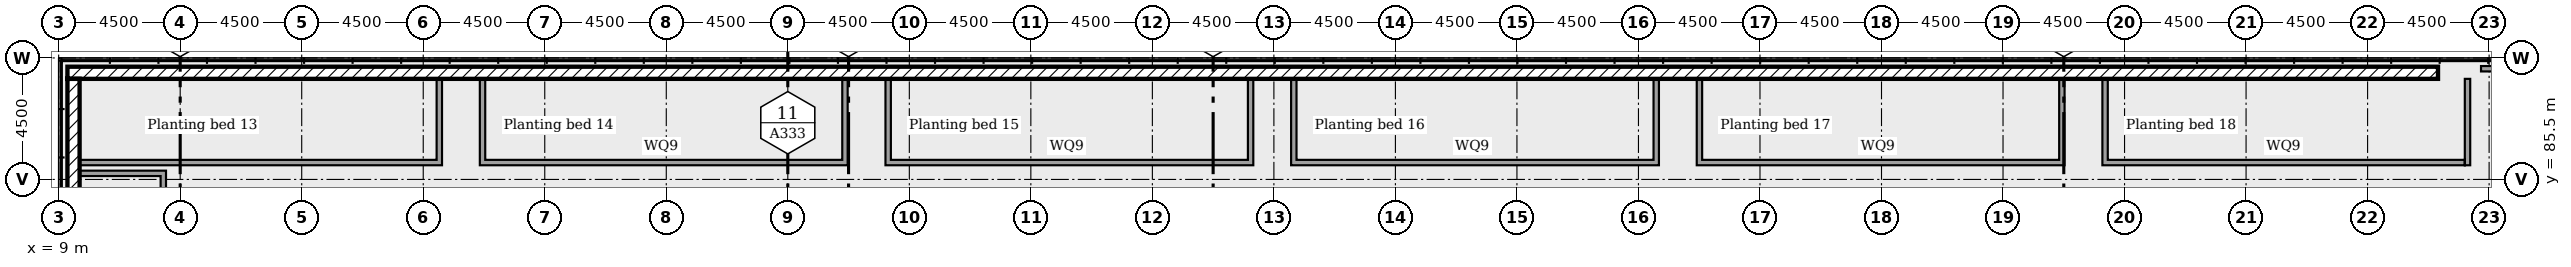
"""IFC4 building model, lengths in metres.
Left out: names, types, materials, properties, quantities, classifications, styles, units other than length and angle.
Written with IfcOpenShell. Run it as: python <this file> out.ifc"""

import sys

from ifc_helpers import new_model, si_unit, direction, frame, frame_2d, origin, place, context, subcontext, project, spatial, rectangle, extrude, element, save


model = new_model("IFC4")
c1 = context("Model", 3, precision=1e-05, world=origin(), true_north=direction((0.0, 1.0)))
c2 = subcontext(c1, "Body", "Model", "MODEL_VIEW")
j1 = project(units=[si_unit("LENGTHUNIT", "METRE"), si_unit("PLANEANGLEUNIT", "RADIAN")], contexts=[c1])
p1 = place(None, origin())
s1 = spatial("IfcSite", under=j1, at=p1, CompositionType="ELEMENT")
p2 = place(p1, origin())
s2 = spatial("IfcBuilding", under=s1, at=p2, CompositionType="ELEMENT")
p3 = place(p2, frame((0.0, 0.0, 11.5)))
s3 = spatial("IfcBuildingStorey", under=s2, at=p3, CompositionType="ELEMENT", Elevation=11.5)
p4 = place(p3, frame((97.107, 89.45, 0.0), z_axis=(0.0, 0.0, 1.0), x_axis=(-1.0, 0.0, 0.0)))
e1 = element("IfcWall", 1, at=p4, inside=s3, PredefinedType="SOLIDWALL", context=c2, shape_type="SweptSolid", body=[
    extrude(rectangle(XDim=87.782, YDim=0.45, at=frame_2d((43.891, 0.0))), origin(), (0.0, 0.0, 1.0), 0.6),
])
p5 = place(p3, frame((9.55, 89.225, 0.0), z_axis=(0.0, 0.0, 1.0), x_axis=(0.0, -1.0, 0.0)))
e2 = element("IfcWall", 2, at=p5, inside=s3, PredefinedType="SOLIDWALL", context=c2, shape_type="SweptSolid", body=[
    extrude(rectangle(XDim=79.45, YDim=0.45, at=frame_2d((39.725, 0.0))), origin(), (0.0, 0.0, 1.0), 0.6),
])
p6 = place(p3, frame((23.096, 86.025, 0.0), z_axis=(0.0, 0.0, 1.0), x_axis=(0.0, 1.0, 0.0)))
e3 = element("IfcWall", 3, at=p6, inside=s3, PredefinedType="SOLIDWALL", context=c2, shape_type="SweptSolid", body=[
    extrude(rectangle(XDim=3.2, YDim=0.2, at=frame_2d((1.6, 0.0))), origin(), (0.0, 0.0, 1.0), 0.45),
])
p7 = place(p3, frame((9.775, 86.125, 0.0)))
e4 = element("IfcWall", 4, at=p7, inside=s3, PredefinedType="SOLIDWALL", context=c2, shape_type="SweptSolid", body=[
    extrude(rectangle(XDim=13.221, YDim=0.2, at=frame_2d((6.61, 0.0))), origin(), (0.0, 0.0, 1.0), 0.45),
])
p8 = place(p3, frame((38.117, 86.025, 0.0), z_axis=(0.0, 0.0, 1.0), x_axis=(0.0, 1.0, 0.0)))
e5 = element("IfcWall", 5, at=p8, inside=s3, PredefinedType="SOLIDWALL", context=c2, shape_type="SweptSolid", body=[
    extrude(rectangle(XDim=3.2, YDim=0.2, at=frame_2d((1.6, 0.0))), origin(), (0.0, 0.0, 1.0), 0.45),
])
p9 = place(p3, frame((24.596, 86.125, 0.0)))
e6 = element("IfcWall", 6, at=p9, inside=s3, PredefinedType="SOLIDWALL", context=c2, shape_type="SweptSolid", body=[
    extrude(rectangle(XDim=13.421, YDim=0.2, at=frame_2d((6.71, 0.0))), origin(), (0.0, 0.0, 1.0), 0.45),
])
p10 = place(p3, frame((24.696, 86.225, 0.0), z_axis=(0.0, 0.0, 1.0), x_axis=(0.0, 1.0, 0.0)))
e7 = element("IfcWall", 7, at=p10, inside=s3, PredefinedType="SOLIDWALL", context=c2, shape_type="SweptSolid", body=[
    extrude(rectangle(XDim=3.0, YDim=0.2, at=frame_2d((1.5, 0.0))), origin(), (0.0, 0.0, 1.0), 0.45),
])
p11 = place(p3, frame((53.137, 86.025, 0.0), z_axis=(0.0, 0.0, 1.0), x_axis=(0.0, 1.0, 0.0)))
e8 = element("IfcWall", 8, at=p11, inside=s3, PredefinedType="SOLIDWALL", context=c2, shape_type="SweptSolid", body=[
    extrude(rectangle(XDim=3.2, YDim=0.2, at=frame_2d((1.6, 0.0))), origin(), (0.0, 0.0, 1.0), 0.45),
])
p12 = place(p3, frame((39.617, 86.125, 0.0)))
e9 = element("IfcWall", 9, at=p12, inside=s3, PredefinedType="SOLIDWALL", context=c2, shape_type="SweptSolid", body=[
    extrude(rectangle(XDim=13.421, YDim=0.2, at=frame_2d((6.71, 0.0))), origin(), (0.0, 0.0, 1.0), 0.45),
])
p13 = place(p3, frame((39.717, 86.225, 0.0), z_axis=(0.0, 0.0, 1.0), x_axis=(0.0, 1.0, 0.0)))
e10 = element("IfcWall", 10, at=p13, inside=s3, PredefinedType="SOLIDWALL", context=c2, shape_type="SweptSolid", body=[
    extrude(rectangle(XDim=3.0, YDim=0.2, at=frame_2d((1.5, 0.0))), origin(), (0.0, 0.0, 1.0), 0.45),
])
p14 = place(p3, frame((68.158, 86.025, 0.0), z_axis=(0.0, 0.0, 1.0), x_axis=(0.0, 1.0, 0.0)))
e11 = element("IfcWall", 11, at=p14, inside=s3, PredefinedType="SOLIDWALL", context=c2, shape_type="SweptSolid", body=[
    extrude(rectangle(XDim=3.2, YDim=0.2, at=frame_2d((1.6, 0.0))), origin(), (0.0, 0.0, 1.0), 0.45),
])
p15 = place(p3, frame((54.637, 86.125, 0.0)))
e12 = element("IfcWall", 12, at=p15, inside=s3, PredefinedType="SOLIDWALL", context=c2, shape_type="SweptSolid", body=[
    extrude(rectangle(XDim=13.421, YDim=0.2, at=frame_2d((6.71, 0.0))), origin(), (0.0, 0.0, 1.0), 0.45),
])
p16 = place(p3, frame((54.738, 86.225, 0.0), z_axis=(0.0, 0.0, 1.0), x_axis=(0.0, 1.0, 0.0)))
e13 = element("IfcWall", 13, at=p16, inside=s3, PredefinedType="SOLIDWALL", context=c2, shape_type="SweptSolid", body=[
    extrude(rectangle(XDim=3.0, YDim=0.2, at=frame_2d((1.5, 0.0))), origin(), (0.0, 0.0, 1.0), 0.45),
])
p17 = place(p3, frame((83.179, 86.025, 0.0), z_axis=(0.0, 0.0, 1.0), x_axis=(0.0, 1.0, 0.0)))
e14 = element("IfcWall", 14, at=p17, inside=s3, PredefinedType="SOLIDWALL", context=c2, shape_type="SweptSolid", body=[
    extrude(rectangle(XDim=3.2, YDim=0.2, at=frame_2d((1.6, 0.0))), origin(), (0.0, 0.0, 1.0), 0.45),
])
p18 = place(p3, frame((69.658, 86.125, 0.0)))
e15 = element("IfcWall", 15, at=p18, inside=s3, PredefinedType="SOLIDWALL", context=c2, shape_type="SweptSolid", body=[
    extrude(rectangle(XDim=13.421, YDim=0.2, at=frame_2d((6.71, 0.0))), origin(), (0.0, 0.0, 1.0), 0.45),
])
p19 = place(p3, frame((69.758, 86.225, 0.0), z_axis=(0.0, 0.0, 1.0), x_axis=(0.0, 1.0, 0.0)))
e16 = element("IfcWall", 16, at=p19, inside=s3, PredefinedType="SOLIDWALL", context=c2, shape_type="SweptSolid", body=[
    extrude(rectangle(XDim=3.0, YDim=0.2, at=frame_2d((1.5, 0.0))), origin(), (0.0, 0.0, 1.0), 0.45),
])
p20 = place(p3, frame((98.2, 86.025, 0.0), z_axis=(0.0, 0.0, 1.0), x_axis=(0.0, 1.0, 0.0)))
e17 = element("IfcWall", 17, at=p20, inside=s3, PredefinedType="SOLIDWALL", context=c2, shape_type="SweptSolid", body=[
    extrude(rectangle(XDim=3.2, YDim=0.2, at=frame_2d((1.6, 0.0))), origin(), (0.0, 0.0, 1.0), 0.45),
])
p21 = place(p3, frame((84.679, 86.125, 0.0)))
e18 = element("IfcWall", 18, at=p21, inside=s3, PredefinedType="SOLIDWALL", context=c2, shape_type="SweptSolid", body=[
    extrude(rectangle(XDim=13.421, YDim=0.2, at=frame_2d((6.71, 0.0))), origin(), (0.0, 0.0, 1.0), 0.45),
])
p22 = place(p3, frame((84.779, 86.225, 0.0), z_axis=(0.0, 0.0, 1.0), x_axis=(0.0, 1.0, 0.0)))
e19 = element("IfcWall", 19, at=p22, inside=s3, PredefinedType="SOLIDWALL", context=c2, shape_type="SweptSolid", body=[
    extrude(rectangle(XDim=3.0, YDim=0.2, at=frame_2d((1.5, 0.0))), origin(), (0.0, 0.0, 1.0), 0.45),
])
p23 = place(p3, frame((12.875, 72.415, 0.0), z_axis=(0.0, 0.0, 1.0), x_axis=(0.0, 1.0, 0.0)))
e20 = element("IfcWall", 20, at=p23, inside=s3, PredefinedType="SOLIDWALL", context=c2, shape_type="SweptSolid", body=[
    extrude(rectangle(XDim=13.41, YDim=0.2, at=frame_2d((6.705, 0.0))), origin(), (0.0, 0.0, 1.0), 0.45),
])
p24 = place(p3, frame((9.775, 85.725, 0.0)))
e21 = element("IfcWall", 21, at=p24, inside=s3, PredefinedType="SOLIDWALL", context=c2, shape_type="SweptSolid", body=[
    extrude(rectangle(XDim=3.0, YDim=0.2, at=frame_2d((1.5, 0.0))), origin(), (0.0, 0.0, 1.0), 0.45),
])
p25 = place(p3, frame((98.7, 89.6, 0.0)))
e22 = element("IfcWall", 22, at=p25, inside=s3, PredefinedType="SOLIDWALL", context=c2, shape_type="SweptSolid", body=[
    extrude(rectangle(XDim=3.8, YDim=0.2, at=frame_2d((1.9, 0.0))), origin(), (0.0, 0.0, 1.0), 2.3),
])
p26 = place(p25, frame((0.6, 0.0, 0.0)))
e23 = element("IfcOpeningElement", 23, at=p26, cuts=e22, PredefinedType="OPENING", context=c2, shape_type="SweptSolid", body=[
    extrude(rectangle(XDim=2.6, YDim=2.1, at=frame_2d((1.3, 1.05))), frame((0.0, 0.11, 0.0), z_axis=(0.0, -1.0, 0.0), x_axis=(1.0, 0.0, 0.0)), (0.0, 0.0, 1.0), 0.22),
])
save(model, sys.argv[1])
